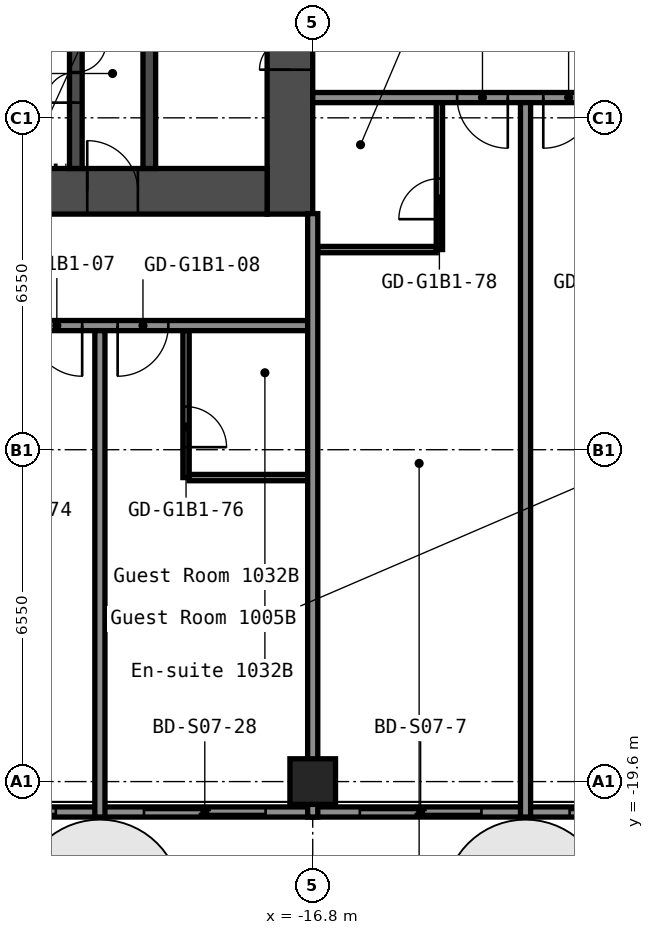
"""IFC4 building model, lengths in metres.
Left out: names, types, materials, properties, quantities, classifications, styles, units other than length and angle.
Written with IfcOpenShell. Run it as: python <this file> out.ifc"""

import sys

from ifc_helpers import new_model, si_unit, direction, frame, frame_2d, origin, origin_2d, place, context, subcontext, project, spatial, rectangle, hollow_rectangle, extrude, element, fill, save


model = new_model("IFC4")
c1 = context("Model", 3, precision=1e-05, world=origin(), true_north=direction((0.0, 1.0)))
c2 = subcontext(c1, "Body", "Model", "MODEL_VIEW")
j1 = project(units=[si_unit("LENGTHUNIT", "METRE"), si_unit("PLANEANGLEUNIT", "RADIAN")], contexts=[c1])
p1 = place(None, origin())
s1 = spatial("IfcSite", under=j1, at=p1, CompositionType="ELEMENT")
p2 = place(p1, origin())
s2 = spatial("IfcBuilding", under=s1, at=p2, CompositionType="ELEMENT")
p3 = place(p2, frame((0.0, 0.0, 39.0)))
s3 = spatial("IfcBuildingStorey", under=s2, at=p3, CompositionType="ELEMENT", Elevation=39.0)
p4 = place(p3, frame((-16.8, -19.6, 0.0), z_axis=(0.0, 0.0, 1.0), x_axis=(1.0, 0.0, 0.0)))
e1 = element("IfcColumn", 1, at=p4, inside=s3, PredefinedType="COLUMN", context=c2, shape_type="SweptSolid", body=[
    extrude(hollow_rectangle(XDim=0.9, YDim=0.9, WallThickness=0.036, at=origin_2d()), origin(), (0.0, 0.0, 1.0), 2.8),
])
p5 = place(p3, frame((-17.25, -8.4, 0.0), z_axis=(0.0, 0.0, 1.0), x_axis=(0.0, 1.0, 0.0)))
e2 = element("IfcWall", 2, at=p5, inside=s3, PredefinedType="SHEAR", context=c2, shape_type="SweptSolid", body=[
    extrude(rectangle(XDim=16.8, YDim=0.9, at=frame_2d((8.4, 0.0))), origin(), (0.0, 0.0, 1.0), 2.8),
])
p6 = place(p5, frame((12.75, 0.0, 0.0)))
e3 = element("IfcOpeningElement", 3, at=p6, cuts=e2, PredefinedType="OPENING", context=c2, shape_type="SweptSolid", body=[
    extrude(rectangle(XDim=1.2, YDim=2.1, at=frame_2d((0.6, 1.05))), frame((0.0, 0.46, 0.0), z_axis=(0.0, -1.0, 0.0), x_axis=(1.0, 0.0, 0.0)), (0.0, 0.0, 1.0), 0.92),
])
p7 = place(p5, frame((2.85, 0.0, 0.0)))
e4 = element("IfcOpeningElement", 4, at=p7, cuts=e2, PredefinedType="OPENING", context=c2, shape_type="SweptSolid", body=[
    extrude(rectangle(XDim=1.2, YDim=2.1, at=frame_2d((0.6, 1.05))), frame((0.0, 0.46, 0.0), z_axis=(0.0, -1.0, 0.0), x_axis=(1.0, 0.0, 0.0)), (0.0, 0.0, 1.0), 0.92),
])
p8 = place(p3, frame((-32.7, -7.95, 0.0), z_axis=(0.0, 0.0, 1.0), x_axis=(1.0, 0.0, 0.0)))
e5 = element("IfcWall", 5, at=p8, inside=s3, PredefinedType="SHEAR", context=c2, shape_type="SweptSolid", body=[
    extrude(rectangle(XDim=15.0, YDim=0.9, at=frame_2d((7.5, 0.0))), origin(), (0.0, 0.0, 1.0), 2.8),
])
p9 = place(p8, frame((11.45, 0.0, 0.0)))
e6 = element("IfcOpeningElement", 6, at=p9, cuts=e5, PredefinedType="OPENING", context=c2, shape_type="SweptSolid", body=[
    extrude(rectangle(XDim=1.0, YDim=2.1, at=frame_2d((0.5, 1.05))), frame((0.0, 0.46, 0.0), z_axis=(0.0, -1.0, 0.0), x_axis=(1.0, 0.0, 0.0)), (0.0, 0.0, 1.0), 0.92),
])
p10 = place(p3, frame((-20.025, -7.5, 0.0), z_axis=(0.0, 0.0, 1.0), x_axis=(0.0, 1.0, 0.0)))
e7 = element("IfcWall", 7, at=p10, inside=s3, PredefinedType="SHEAR", context=c2, shape_type="SweptSolid", body=[
    extrude(rectangle(XDim=6.3, YDim=0.25, at=frame_2d((3.15, 0.0))), origin(), (0.0, 0.0, 1.0), 2.8),
])
p11 = place(p10, frame((2.4, 0.0, 0.0)))
e8 = element("IfcOpeningElement", 8, at=p11, cuts=e7, PredefinedType="OPENING", context=c2, shape_type="SweptSolid", body=[
    extrude(rectangle(XDim=1.0, YDim=2.1, at=frame_2d((0.5, 1.05))), frame((0.0, 0.135, 0.0), z_axis=(0.0, -1.0, 0.0), x_axis=(1.0, 0.0, 0.0)), (0.0, 0.0, 1.0), 0.27),
])
p12 = place(p3, frame((-21.475, -7.5, 0.0), z_axis=(0.0, 0.0, 1.0), x_axis=(0.0, 1.0, 0.0)))
e9 = element("IfcWall", 9, at=p12, inside=s3, PredefinedType="SHEAR", context=c2, shape_type="SweptSolid", body=[
    extrude(rectangle(XDim=3.75, YDim=0.25, at=frame_2d((1.875, 0.0))), origin(), (0.0, 0.0, 1.0), 2.8),
])
p13 = place(p12, frame((1.3, 0.0, 0.0)))
e10 = element("IfcOpeningElement", 10, at=p13, cuts=e9, PredefinedType="OPENING", context=c2, shape_type="SweptSolid", body=[
    extrude(rectangle(XDim=1.2, YDim=2.1, at=frame_2d((0.6, 1.05))), frame((0.0, 0.135, 0.0), z_axis=(0.0, -1.0, 0.0), x_axis=(1.0, 0.0, 0.0)), (0.0, 0.0, 1.0), 0.27),
])
p14 = place(p3, frame((-19.238, -13.6, 0.0), z_axis=(0.0, 0.0, 1.0), x_axis=(1.0, 0.0, 0.0)))
e11 = element("IfcWall", 11, at=p14, inside=s3, PredefinedType="PARTITIONING", context=c2, shape_type="SweptSolid", body=[
    extrude(rectangle(XDim=2.338, YDim=0.125, at=frame_2d((1.169, 0.0))), origin(), (0.0, 0.0, 1.0), 2.8),
])
p15 = place(p3, frame((-51.1, -10.6, 0.0), z_axis=(0.0, 0.0, 1.0), x_axis=(1.0, 0.0, 0.0)))
e12 = element("IfcWall", 12, at=p15, inside=s3, PredefinedType="PARTITIONING", context=c2, shape_type="SweptSolid", body=[
    extrude(rectangle(XDim=34.3, YDim=0.2, at=frame_2d((17.15, 0.0))), origin(), (0.0, 0.0, 1.0), 2.8),
])
p16 = place(p15, frame((3.25, 0.0, 0.0)))
e13 = element("IfcOpeningElement", 13, at=p16, cuts=e12, PredefinedType="OPENING", context=c2, shape_type="SweptSolid", body=[
    extrude(rectangle(XDim=1.0, YDim=2.1, at=frame_2d((0.5, 1.05))), frame((0.0, 0.11, 0.0), z_axis=(0.0, -1.0, 0.0), x_axis=(1.0, 0.0, 0.0)), (0.0, 0.0, 1.0), 0.22),
])
p17 = place(p15, frame((5.15, 0.0, 0.0)))
e14 = element("IfcOpeningElement", 14, at=p17, cuts=e12, PredefinedType="OPENING", context=c2, shape_type="SweptSolid", body=[
    extrude(rectangle(XDim=1.0, YDim=2.1, at=frame_2d((0.5, 1.05))), frame((0.0, 0.11, 0.0), z_axis=(0.0, -1.0, 0.0), x_axis=(1.0, 0.0, 0.0)), (0.0, 0.0, 1.0), 0.22),
])
p18 = place(p15, frame((11.95, 0.0, 0.0)))
e15 = element("IfcOpeningElement", 15, at=p18, cuts=e12, PredefinedType="OPENING", context=c2, shape_type="SweptSolid", body=[
    extrude(rectangle(XDim=1.0, YDim=2.1, at=frame_2d((0.5, 1.05))), frame((0.0, 0.11, 0.0), z_axis=(0.0, -1.0, 0.0), x_axis=(1.0, 0.0, 0.0)), (0.0, 0.0, 1.0), 0.22),
])
p19 = place(p15, frame((13.65, 0.0, 0.0)))
e16 = element("IfcOpeningElement", 16, at=p19, cuts=e12, PredefinedType="OPENING", context=c2, shape_type="SweptSolid", body=[
    extrude(rectangle(XDim=1.0, YDim=2.1, at=frame_2d((0.5, 1.05))), frame((0.0, 0.11, 0.0), z_axis=(0.0, -1.0, 0.0), x_axis=(1.0, 0.0, 0.0)), (0.0, 0.0, 1.0), 0.22),
])
p20 = place(p15, frame((20.35, 0.0, 0.0)))
e17 = element("IfcOpeningElement", 17, at=p20, cuts=e12, PredefinedType="OPENING", context=c2, shape_type="SweptSolid", body=[
    extrude(rectangle(XDim=1.0, YDim=2.1, at=frame_2d((0.5, 1.05))), frame((0.0, 0.11, 0.0), z_axis=(0.0, -1.0, 0.0), x_axis=(1.0, 0.0, 0.0)), (0.0, 0.0, 1.0), 0.22),
])
p21 = place(p15, frame((22.05, 0.0, 0.0)))
e18 = element("IfcOpeningElement", 18, at=p21, cuts=e12, PredefinedType="OPENING", context=c2, shape_type="SweptSolid", body=[
    extrude(rectangle(XDim=1.0, YDim=2.1, at=frame_2d((0.5, 1.05))), frame((0.0, 0.11, 0.0), z_axis=(0.0, -1.0, 0.0), x_axis=(1.0, 0.0, 0.0)), (0.0, 0.0, 1.0), 0.22),
])
p22 = place(p15, frame((28.75, 0.0, 0.0)))
e19 = element("IfcOpeningElement", 19, at=p22, cuts=e12, PredefinedType="OPENING", context=c2, shape_type="SweptSolid", body=[
    extrude(rectangle(XDim=1.0, YDim=2.1, at=frame_2d((0.5, 1.05))), frame((0.0, 0.11, 0.0), z_axis=(0.0, -1.0, 0.0), x_axis=(1.0, 0.0, 0.0)), (0.0, 0.0, 1.0), 0.22),
])
p23 = place(p15, frame((30.45, 0.0, 0.0)))
e20 = element("IfcOpeningElement", 20, at=p23, cuts=e12, PredefinedType="OPENING", context=c2, shape_type="SweptSolid", body=[
    extrude(rectangle(XDim=1.0, YDim=2.1, at=frame_2d((0.5, 1.05))), frame((0.0, 0.11, 0.0), z_axis=(0.0, -1.0, 0.0), x_axis=(1.0, 0.0, 0.0)), (0.0, 0.0, 1.0), 0.22),
])
p24 = place(p3, frame((-16.7, -9.1, 0.0), z_axis=(0.0, 0.0, 1.0), x_axis=(1.0, 0.0, 0.0)))
e21 = element("IfcWall", 21, at=p24, inside=s3, PredefinedType="PARTITIONING", context=c2, shape_type="SweptSolid", body=[
    extrude(rectangle(XDim=2.337, YDim=0.125, at=frame_2d((1.169, 0.0))), origin(), (0.0, 0.0, 1.0), 2.8),
])
p25 = place(p3, frame((-16.8, -6.1, 0.0), z_axis=(0.0, 0.0, 1.0), x_axis=(1.0, 0.0, 0.0)))
e22 = element("IfcWall", 22, at=p25, inside=s3, PredefinedType="PARTITIONING", context=c2, shape_type="SweptSolid", body=[
    extrude(rectangle(XDim=33.6, YDim=0.2, at=frame_2d((16.8, 0.0))), origin(), (0.0, 0.0, 1.0), 2.8),
])
p26 = place(p25, frame((2.85, 0.0, 0.0)))
e23 = element("IfcOpeningElement", 23, at=p26, cuts=e22, PredefinedType="OPENING", context=c2, shape_type="SweptSolid", body=[
    extrude(rectangle(XDim=1.0, YDim=2.1, at=frame_2d((0.5, 1.05))), frame((0.0, 0.11, 0.0), z_axis=(0.0, -1.0, 0.0), x_axis=(1.0, 0.0, 0.0)), (0.0, 0.0, 1.0), 0.22),
])
p27 = place(p25, frame((4.55, 0.0, 0.0)))
e24 = element("IfcOpeningElement", 24, at=p27, cuts=e22, PredefinedType="OPENING", context=c2, shape_type="SweptSolid", body=[
    extrude(rectangle(XDim=1.0, YDim=2.1, at=frame_2d((0.5, 1.05))), frame((0.0, 0.11, 0.0), z_axis=(0.0, -1.0, 0.0), x_axis=(1.0, 0.0, 0.0)), (0.0, 0.0, 1.0), 0.22),
])
p28 = place(p25, frame((11.25, 0.0, 0.0)))
e25 = element("IfcOpeningElement", 25, at=p28, cuts=e22, PredefinedType="OPENING", context=c2, shape_type="SweptSolid", body=[
    extrude(rectangle(XDim=1.0, YDim=2.1, at=frame_2d((0.5, 1.05))), frame((0.0, 0.11, 0.0), z_axis=(0.0, -1.0, 0.0), x_axis=(1.0, 0.0, 0.0)), (0.0, 0.0, 1.0), 0.22),
])
p29 = place(p25, frame((12.95, 0.0, 0.0)))
e26 = element("IfcOpeningElement", 26, at=p29, cuts=e22, PredefinedType="OPENING", context=c2, shape_type="SweptSolid", body=[
    extrude(rectangle(XDim=1.0, YDim=2.1, at=frame_2d((0.5, 1.05))), frame((0.0, 0.11, 0.0), z_axis=(0.0, -1.0, 0.0), x_axis=(1.0, 0.0, 0.0)), (0.0, 0.0, 1.0), 0.22),
])
p30 = place(p25, frame((18.28, 0.0, 0.0)))
e27 = element("IfcOpeningElement", 27, at=p30, cuts=e22, PredefinedType="OPENING", context=c2, shape_type="SweptSolid", body=[
    extrude(rectangle(XDim=0.9, YDim=2.1, at=frame_2d((0.45, 1.05))), frame((0.0, 0.11, 0.0), z_axis=(0.0, -1.0, 0.0), x_axis=(1.0, 0.0, 0.0)), (0.0, 0.0, 1.0), 0.22),
])
p31 = place(p25, frame((22.48, 0.0, 0.0)))
e28 = element("IfcOpeningElement", 28, at=p31, cuts=e22, PredefinedType="OPENING", context=c2, shape_type="SweptSolid", body=[
    extrude(rectangle(XDim=0.9, YDim=2.1, at=frame_2d((0.45, 1.05))), frame((0.0, 0.11, 0.0), z_axis=(0.0, -1.0, 0.0), x_axis=(1.0, 0.0, 0.0)), (0.0, 0.0, 1.0), 0.22),
])
p32 = place(p25, frame((28.05, 0.0, 0.0)))
e29 = element("IfcOpeningElement", 29, at=p32, cuts=e22, PredefinedType="OPENING", context=c2, shape_type="SweptSolid", body=[
    extrude(rectangle(XDim=1.0, YDim=2.1, at=frame_2d((0.5, 1.05))), frame((0.0, 0.11, 0.0), z_axis=(0.0, -1.0, 0.0), x_axis=(1.0, 0.0, 0.0)), (0.0, 0.0, 1.0), 0.22),
])
p33 = place(p25, frame((29.75, 0.0, 0.0)))
e30 = element("IfcOpeningElement", 30, at=p33, cuts=e22, PredefinedType="OPENING", context=c2, shape_type="SweptSolid", body=[
    extrude(rectangle(XDim=1.0, YDim=2.1, at=frame_2d((0.5, 1.05))), frame((0.0, 0.11, 0.0), z_axis=(0.0, -1.0, 0.0), x_axis=(1.0, 0.0, 0.0)), (0.0, 0.0, 1.0), 0.22),
])
p34 = place(p3, frame((-21.0, -20.3, 0.0), z_axis=(0.0, 0.0, 1.0), x_axis=(0.0, 1.0, 0.0)))
e31 = element("IfcWall", 31, at=p34, inside=s3, PredefinedType="PARTITIONING", context=c2, shape_type="SweptSolid", body=[
    extrude(rectangle(XDim=9.6, YDim=0.2, at=frame_2d((4.8, 0.0))), origin(), (0.0, 0.0, 1.0), 2.8),
])
p35 = place(p3, frame((-19.3, -13.6, 0.0), z_axis=(0.0, 0.0, 1.0), x_axis=(0.0, 1.0, 0.0)))
e32 = element("IfcWall", 32, at=p35, inside=s3, PredefinedType="PARTITIONING", context=c2, shape_type="SweptSolid", body=[
    extrude(rectangle(XDim=2.9, YDim=0.125, at=frame_2d((1.45, 0.0))), origin(), (0.0, 0.0, 1.0), 2.8),
])
p36 = place(p35, frame((0.6, 0.0, 0.0)))
e33 = element("IfcOpeningElement", 33, at=p36, cuts=e32, PredefinedType="OPENING", context=c2, shape_type="SweptSolid", body=[
    extrude(rectangle(XDim=0.8, YDim=2.1, at=frame_2d((0.4, 1.05))), frame((0.0, 0.073, 0.0), z_axis=(0.0, -1.0, 0.0), x_axis=(1.0, 0.0, 0.0)), (0.0, 0.0, 1.0), 0.145),
])
p37 = place(p3, frame((-16.8, -20.3, 0.0), z_axis=(0.0, 0.0, 1.0), x_axis=(0.0, 1.0, 0.0)))
e34 = element("IfcWall", 34, at=p37, inside=s3, PredefinedType="PARTITIONING", context=c2, shape_type="SweptSolid", body=[
    extrude(rectangle(XDim=11.91, YDim=0.2, at=frame_2d((5.955, 0.0))), origin(), (0.0, 0.0, 1.0), 2.8),
])
p38 = place(p3, frame((-14.3, -9.1, 0.0), z_axis=(0.0, 0.0, 1.0), x_axis=(0.0, 1.0, 0.0)))
e35 = element("IfcWall", 35, at=p38, inside=s3, PredefinedType="PARTITIONING", context=c2, shape_type="SweptSolid", body=[
    extrude(rectangle(XDim=2.9, YDim=0.125, at=frame_2d((1.45, 0.0))), origin(), (0.0, 0.0, 1.0), 2.8),
])
p39 = place(p38, frame((0.6, 0.0, 0.0)))
e36 = element("IfcOpeningElement", 36, at=p39, cuts=e35, PredefinedType="OPENING", context=c2, shape_type="SweptSolid", body=[
    extrude(rectangle(XDim=0.8, YDim=2.1, at=frame_2d((0.4, 1.05))), frame((0.0, 0.073, 0.0), z_axis=(0.0, -1.0, 0.0), x_axis=(1.0, 0.0, 0.0)), (0.0, 0.0, 1.0), 0.145),
])
p40 = place(p3, frame((-12.6, -20.3, 0.0), z_axis=(0.0, 0.0, 1.0), x_axis=(0.0, 1.0, 0.0)))
e37 = element("IfcWall", 37, at=p40, inside=s3, PredefinedType="PARTITIONING", context=c2, shape_type="SweptSolid", body=[
    extrude(rectangle(XDim=14.1, YDim=0.2, at=frame_2d((7.05, 0.0))), origin(), (0.0, 0.0, 1.0), 2.8),
])
p41 = place(p3, frame((-25.18, -20.2, 0.0), z_axis=(0.0, 0.0, 1.0), x_axis=(1.0, 0.0, 0.0)))
p42 = place(p41, frame((0.91, 0.0, 0.0)))
p43 = place(p42, frame((2.4, 0.0, 0.0), z_axis=(0.0, 0.0, 1.0), x_axis=(-1.0, 0.0, 0.0)))
e38 = element("IfcDoor", 38, at=p43, inside=s3, OperationType="SLIDING_TO_LEFT", PredefinedType="DOOR", context=c2, shape_type="SweptSolid", body=[
    extrude(rectangle(XDim=2.4, YDim=2.2, at=frame_2d((1.2, 1.1))), frame((0.0, 0.025, 0.0), z_axis=(0.0, -1.0, 0.0), x_axis=(1.0, 0.0, 0.0)), (0.0, 0.0, 1.0), 0.05),
])
p44 = place(p3, frame((-21.04, -20.2, 0.0), z_axis=(0.0, 0.0, 1.0), x_axis=(1.0, 0.0, 0.0)))
p45 = place(p44, frame((0.91, 0.0, 0.0)))
p46 = place(p45, frame((2.4, 0.0, 0.0), z_axis=(0.0, 0.0, 1.0), x_axis=(-1.0, 0.0, 0.0)))
e39 = element("IfcDoor", 39, at=p46, inside=s3, OperationType="SLIDING_TO_LEFT", PredefinedType="DOOR", context=c2, shape_type="SweptSolid", body=[
    extrude(rectangle(XDim=2.4, YDim=2.2, at=frame_2d((1.2, 1.1))), frame((0.0, 0.025, 0.0), z_axis=(0.0, -1.0, 0.0), x_axis=(1.0, 0.0, 0.0)), (0.0, 0.0, 1.0), 0.05),
])
p47 = place(p3, frame((-16.78, -20.2, 0.0), z_axis=(0.0, 0.0, 1.0), x_axis=(1.0, 0.0, 0.0)))
p48 = place(p47, frame((0.91, 0.0, 0.0)))
p49 = place(p48, frame((2.4, 0.0, 0.0), z_axis=(0.0, 0.0, 1.0), x_axis=(-1.0, 0.0, 0.0)))
e40 = element("IfcDoor", 40, at=p49, inside=s3, OperationType="SLIDING_TO_LEFT", PredefinedType="DOOR", context=c2, shape_type="SweptSolid", body=[
    extrude(rectangle(XDim=2.4, YDim=2.2, at=frame_2d((1.2, 1.1))), frame((0.0, 0.025, 0.0), z_axis=(0.0, -1.0, 0.0), x_axis=(1.0, 0.0, 0.0)), (0.0, 0.0, 1.0), 0.05),
])
p50 = place(p3, frame((-12.64, -20.2, 0.0), z_axis=(0.0, 0.0, 1.0), x_axis=(1.0, 0.0, 0.0)))
p51 = place(p50, frame((0.91, 0.0, 0.0)))
p52 = place(p51, frame((2.4, 0.0, 0.0), z_axis=(0.0, 0.0, 1.0), x_axis=(-1.0, 0.0, 0.0)))
e41 = element("IfcDoor", 41, at=p52, inside=s3, OperationType="SLIDING_TO_LEFT", PredefinedType="DOOR", context=c2, shape_type="SweptSolid", body=[
    extrude(rectangle(XDim=2.4, YDim=2.2, at=frame_2d((1.2, 1.1))), frame((0.0, 0.025, 0.0), z_axis=(0.0, -1.0, 0.0), x_axis=(1.0, 0.0, 0.0)), (0.0, 0.0, 1.0), 0.05),
])
p53 = place(p7, origin())
e42 = element("IfcDoor", 42, at=p53, inside=s3, OperationType="DOUBLE_DOOR_SINGLE_SWING", PredefinedType="DOOR", context=c2, shape_type="SweptSolid", body=[
    extrude(rectangle(XDim=1.2, YDim=2.1, at=frame_2d((0.6, 1.05))), frame((0.0, 0.025, 0.0), z_axis=(0.0, -1.0, 0.0), x_axis=(1.0, 0.0, 0.0)), (0.0, 0.0, 1.0), 0.05),
])
fill(e4, e42)
p54 = place(p9, origin())
e43 = element("IfcDoor", 43, at=p54, inside=s3, OperationType="SINGLE_SWING_RIGHT", PredefinedType="DOOR", context=c2, shape_type="SweptSolid", body=[
    extrude(rectangle(XDim=1.0, YDim=2.1, at=frame_2d((0.5, 1.05))), frame((0.0, 0.025, 0.0), z_axis=(0.0, -1.0, 0.0), x_axis=(1.0, 0.0, 0.0)), (0.0, 0.0, 1.0), 0.05),
])
fill(e6, e43)
p55 = place(p13, origin())
e44 = element("IfcDoor", 44, at=p55, inside=s3, OperationType="DOUBLE_DOOR_SINGLE_SWING", PredefinedType="DOOR", context=c2, shape_type="SweptSolid", body=[
    extrude(rectangle(XDim=1.2, YDim=2.1, at=frame_2d((0.6, 1.05))), frame((0.0, 0.025, 0.0), z_axis=(0.0, -1.0, 0.0), x_axis=(1.0, 0.0, 0.0)), (0.0, 0.0, 1.0), 0.05),
])
fill(e10, e44)
p56 = place(p22, origin())
e45 = element("IfcDoor", 45, at=p56, inside=s3, OperationType="SINGLE_SWING_RIGHT", PredefinedType="DOOR", context=c2, shape_type="SweptSolid", body=[
    extrude(rectangle(XDim=1.0, YDim=2.1, at=frame_2d((0.5, 1.05))), frame((0.0, 0.025, 0.0), z_axis=(0.0, -1.0, 0.0), x_axis=(1.0, 0.0, 0.0)), (0.0, 0.0, 1.0), 0.05),
])
fill(e19, e45)
p57 = place(p23, origin())
e46 = element("IfcDoor", 46, at=p57, inside=s3, OperationType="SINGLE_SWING_LEFT", PredefinedType="DOOR", context=c2, shape_type="SweptSolid", body=[
    extrude(rectangle(XDim=1.0, YDim=2.1, at=frame_2d((0.5, 1.05))), frame((0.0, 0.025, 0.0), z_axis=(0.0, -1.0, 0.0), x_axis=(1.0, 0.0, 0.0)), (0.0, 0.0, 1.0), 0.05),
])
fill(e20, e46)
p58 = place(p26, origin())
e47 = element("IfcDoor", 47, at=p58, inside=s3, OperationType="SINGLE_SWING_RIGHT", PredefinedType="DOOR", context=c2, shape_type="SweptSolid", body=[
    extrude(rectangle(XDim=1.0, YDim=2.1, at=frame_2d((0.5, 1.05))), frame((0.0, 0.025, 0.0), z_axis=(0.0, -1.0, 0.0), x_axis=(1.0, 0.0, 0.0)), (0.0, 0.0, 1.0), 0.05),
])
fill(e23, e47)
p59 = place(p27, origin())
e48 = element("IfcDoor", 48, at=p59, inside=s3, OperationType="SINGLE_SWING_LEFT", PredefinedType="DOOR", context=c2, shape_type="SweptSolid", body=[
    extrude(rectangle(XDim=1.0, YDim=2.1, at=frame_2d((0.5, 1.05))), frame((0.0, 0.025, 0.0), z_axis=(0.0, -1.0, 0.0), x_axis=(1.0, 0.0, 0.0)), (0.0, 0.0, 1.0), 0.05),
])
fill(e24, e48)
p60 = place(p36, origin())
e49 = element("IfcDoor", 49, at=p60, inside=s3, OperationType="SINGLE_SWING_LEFT", PredefinedType="DOOR", context=c2, shape_type="SweptSolid", body=[
    extrude(rectangle(XDim=0.8, YDim=2.1, at=frame_2d((0.4, 1.05))), frame((0.0, 0.025, 0.0), z_axis=(0.0, -1.0, 0.0), x_axis=(1.0, 0.0, 0.0)), (0.0, 0.0, 1.0), 0.05),
])
fill(e33, e49)
p61 = place(p39, origin())
e50 = element("IfcDoor", 50, at=p61, inside=s3, OperationType="SINGLE_SWING_RIGHT", PredefinedType="DOOR", context=c2, shape_type="SweptSolid", body=[
    extrude(rectangle(XDim=0.8, YDim=2.1, at=frame_2d((0.4, 1.05))), frame((0.0, 0.025, 0.0), z_axis=(0.0, -1.0, 0.0), x_axis=(1.0, 0.0, 0.0)), (0.0, 0.0, 1.0), 0.05),
])
fill(e36, e50)
save(model, sys.argv[1])
